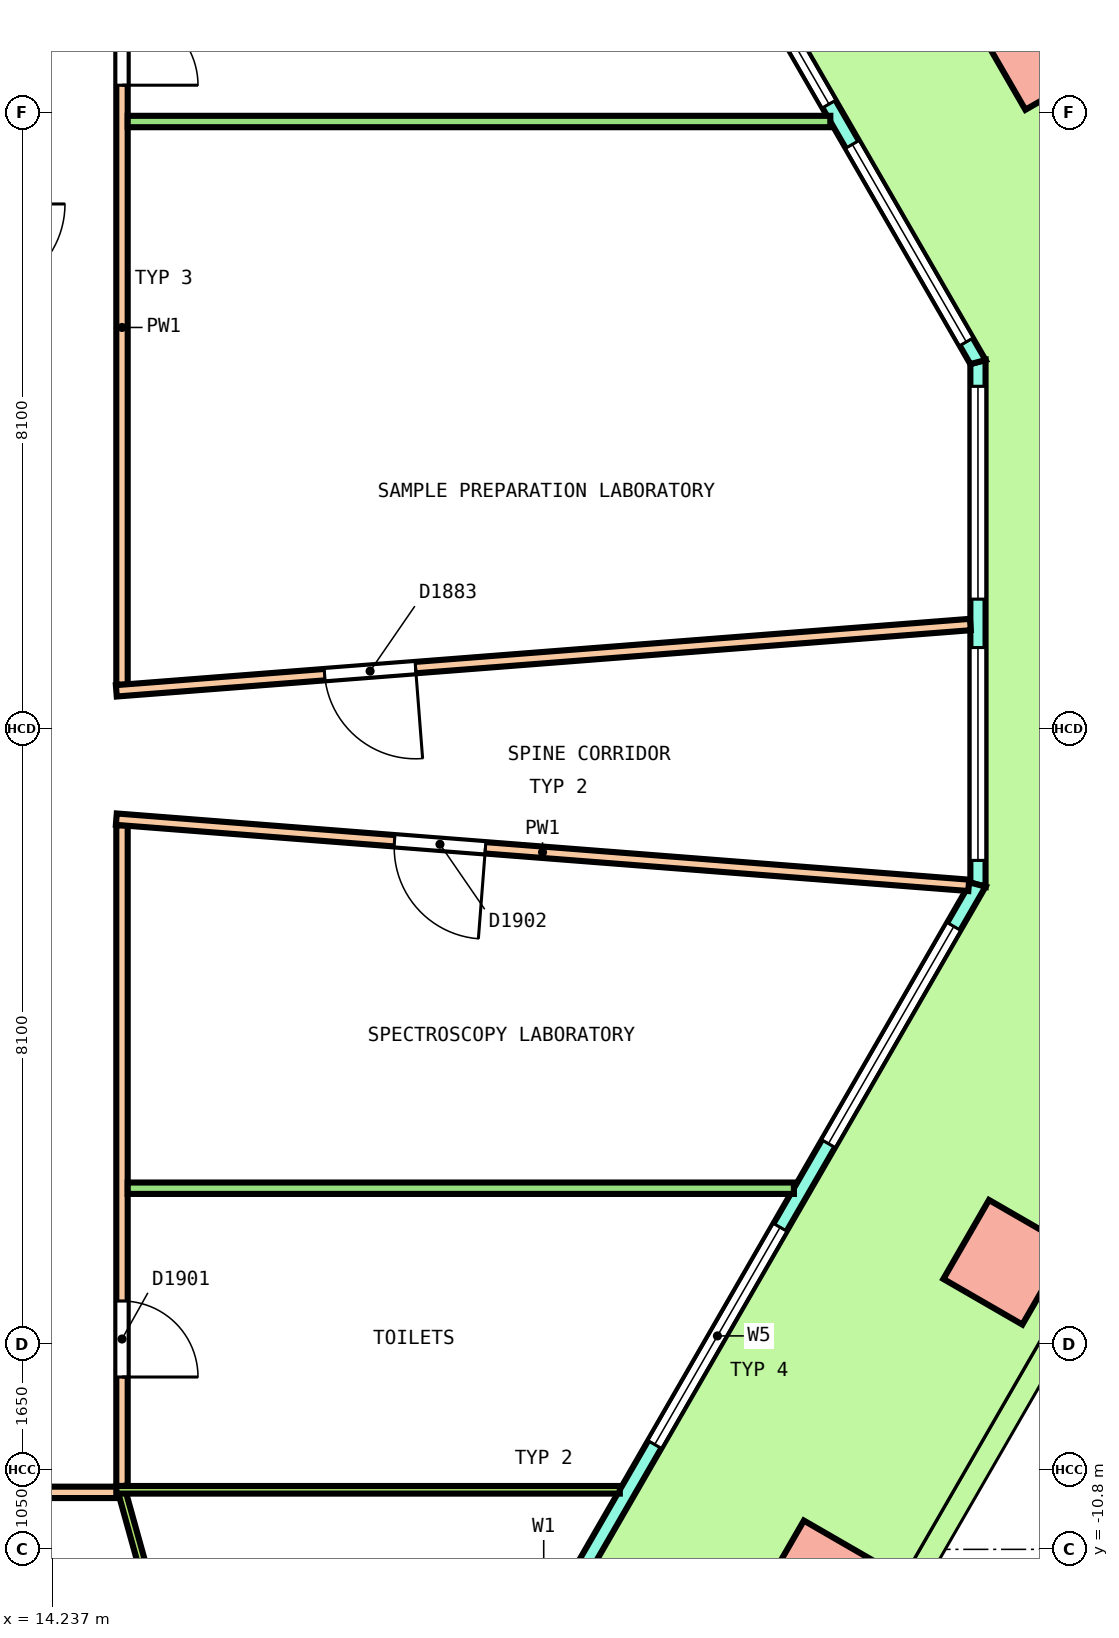
"""IFC4 building model, lengths in metres.
Left out: names, types, materials, properties, quantities, classifications, styles, units other than length and angle.
Written with IfcOpenShell. Run it as: python <this file> out.ifc"""

import sys

from ifc_helpers import new_model, si_unit, direction, frame, frame_2d, origin, origin_2d, place, context, subcontext, project, spatial, polyline, rectangle, outline, extrude, element, fill, save


model = new_model("IFC4")
c1 = context("Model", 3, precision=1e-05, world=origin(), true_north=direction((0.0, 1.0)))
c2 = subcontext(c1, "Body", "Model", "MODEL_VIEW")
j1 = project(units=[si_unit("LENGTHUNIT", "METRE"), si_unit("PLANEANGLEUNIT", "RADIAN")], contexts=[c1])
p1 = place(None, origin())
s1 = spatial("IfcSite", under=j1, at=p1, CompositionType="ELEMENT")
p2 = place(p1, origin())
s2 = spatial("IfcBuilding", under=s1, at=p2, CompositionType="ELEMENT")
p3 = place(p2, frame((0.0, 0.0, 189.2)))
s3 = spatial("IfcBuildingStorey", under=s2, at=p3, CompositionType="ELEMENT", Elevation=189.2)
for number, where, z_axis, x_axis in (
    (1, (27.255, 8.959, 0.0), (0.0, 0.0, 1.0), (-0.5, 0.866, 0.0)),
    (2, (24.341, -11.241, 0.0), (0.0, 0.0, 1.0), (0.5, 0.866, 0.0)),
    (3, (26.776, -7.023, 0.0), (0.0, 0.0, 1.0), (0.5, 0.866, 0.0)),
):
    element("IfcColumn", number, at=place(p3, frame(where, z_axis=z_axis, x_axis=x_axis)), inside=s3, PredefinedType="COLUMN", context=c2, shape_type="SweptSolid", body=[
        extrude(rectangle(XDim=1.2, YDim=1.2, at=origin_2d()), origin(), (0.0, 0.0, 1.0), 4.05),
    ])
p4 = place(p3, frame((26.411, -2.055, 0.0), z_axis=(0.0, 0.0, 1.0), x_axis=(0.0, 1.0, 0.0)))
e4 = element("IfcWall", 4, at=p4, inside=s3, PredefinedType="SOLIDWALL", context=c2, shape_type="SweptSolid", body=[
    extrude(outline(polyline([(-0.027, -0.1), (1.128, -0.1), (2.283, -0.1), (3.438, -0.1), (4.592, -0.1), (5.747, -0.1), (6.902, -0.1), (6.848, 0.1), (5.711, 0.1), (4.574, 0.1), (3.438, 0.1), (2.301, 0.1), (1.164, 0.1), (0.027, 0.1), (-0.027, -0.1)])), origin(), (0.0, 0.0, 1.0), 4.1),
])
p5 = place(p4, frame((0.319, 0.0, 0.1)))
e5 = element("IfcOpeningElement", 5, at=p5, cuts=e4, PredefinedType="OPENING", context=c2, shape_type="SweptSolid", body=[
    extrude(rectangle(XDim=2.8, YDim=2.9, at=frame_2d((1.4, 1.45))), frame((0.0, 0.11, 0.0), z_axis=(0.0, -1.0, 0.0), x_axis=(1.0, 0.0, 0.0)), (0.0, 0.0, 1.0), 0.22),
])
p6 = place(p4, frame((3.756, 0.0, 0.1)))
e6 = element("IfcOpeningElement", 6, at=p6, cuts=e4, PredefinedType="OPENING", context=c2, shape_type="SweptSolid", body=[
    extrude(rectangle(XDim=2.8, YDim=2.9, at=frame_2d((1.4, 1.45))), frame((0.0, 0.11, 0.0), z_axis=(0.0, -1.0, 0.0), x_axis=(1.0, 0.0, 0.0)), (0.0, 0.0, 1.0), 0.22),
])
p7 = place(p3, frame((26.411, 4.82, 0.0), z_axis=(0.0, 0.0, 1.0), x_axis=(-0.500000137386, 0.866025324465, 0.0)))
e7 = element("IfcWall", 7, at=p7, inside=s3, PredefinedType="SOLIDWALL", context=c2, shape_type="SweptSolid", body=[
    extrude(outline(polyline([(-0.027, -0.1), (0.979, -0.1), (1.986, -0.1), (2.992, -0.1), (3.999, -0.1), (5.005, -0.1), (6.012, -0.1), (7.018, -0.1), (8.025, -0.1), (9.031, -0.1), (10.038, -0.1), (11.044, -0.1), (12.051, -0.1), (13.057, -0.1), (14.063, -0.1), (15.07, -0.1), (16.076, -0.1), (17.083, -0.1), (18.089, -0.1), (18.036, 0.1), (17.035, 0.1), (16.035, 0.1), (15.034, 0.1), (14.034, 0.1), (13.033, 0.1), (12.033, 0.1), (11.032, 0.1), (10.032, 0.1), (9.031, 0.1), (8.031, 0.1), (7.03, 0.1), (6.03, 0.1), (5.029, 0.1), (4.029, 0.1), (3.028, 0.1), (2.028, 0.1), (1.027, 0.1), (0.027, 0.1), (-0.027, -0.1)])), origin(), (0.0, 0.0, 1.0), 4.1),
])
p8 = place(p7, frame((0.306, 0.0, 0.1)))
e8 = element("IfcOpeningElement", 8, at=p8, cuts=e7, PredefinedType="OPENING", context=c2, shape_type="SweptSolid", body=[
    extrude(rectangle(XDim=3.0, YDim=2.9, at=frame_2d((1.5, 1.45))), frame((0.0, 0.11, 0.0), z_axis=(0.0, -1.0, 0.0), x_axis=(1.0, 0.0, 0.0)), (0.0, 0.0, 1.0), 0.22),
])
p9 = place(p7, frame((3.919, 0.0, 0.1)))
e9 = element("IfcOpeningElement", 9, at=p9, cuts=e7, PredefinedType="OPENING", context=c2, shape_type="SweptSolid", body=[
    extrude(rectangle(XDim=3.0, YDim=2.9, at=frame_2d((1.5, 1.45))), frame((0.0, 0.11, 0.0), z_axis=(0.0, -1.0, 0.0), x_axis=(1.0, 0.0, 0.0)), (0.0, 0.0, 1.0), 0.22),
])
p10 = place(p7, frame((8.131, 0.0, 0.0)))
e10 = element("IfcOpeningElement", 10, at=p10, cuts=e7, PredefinedType="OPENING", context=c2, shape_type="SweptSolid", body=[
    extrude(rectangle(XDim=1.8, YDim=2.4, at=frame_2d((0.9, 1.2))), frame((0.0, 0.11, 0.0), z_axis=(0.0, -1.0, 0.0), x_axis=(1.0, 0.0, 0.0)), (0.0, 0.0, 1.0), 0.22),
])
p11 = place(p7, frame((8.131, 0.0, 2.55)))
e11 = element("IfcOpeningElement", 11, at=p11, cuts=e7, PredefinedType="OPENING", context=c2, shape_type="SweptSolid", body=[
    extrude(rectangle(XDim=1.8, YDim=0.45, at=frame_2d((0.9, 0.225))), frame((0.0, 0.11, 0.0), z_axis=(0.0, -1.0, 0.0), x_axis=(1.0, 0.0, 0.0)), (0.0, 0.0, 1.0), 0.22),
])
p12 = place(p7, frame((11.144, 0.0, 0.1)))
e12 = element("IfcOpeningElement", 12, at=p12, cuts=e7, PredefinedType="OPENING", context=c2, shape_type="SweptSolid", body=[
    extrude(rectangle(XDim=3.0, YDim=2.9, at=frame_2d((1.5, 1.45))), frame((0.0, 0.11, 0.0), z_axis=(0.0, -1.0, 0.0), x_axis=(1.0, 0.0, 0.0)), (0.0, 0.0, 1.0), 0.22),
])
p13 = place(p7, frame((14.756, 0.0, 0.1)))
e13 = element("IfcOpeningElement", 13, at=p13, cuts=e7, PredefinedType="OPENING", context=c2, shape_type="SweptSolid", body=[
    extrude(rectangle(XDim=3.0, YDim=2.9, at=frame_2d((1.5, 1.45))), frame((0.0, 0.11, 0.0), z_axis=(0.0, -1.0, 0.0), x_axis=(1.0, 0.0, 0.0)), (0.0, 0.0, 1.0), 0.22),
])
p14 = place(p3, frame((14.985, -21.845, 0.0), z_axis=(0.0, 0.0, 1.0), x_axis=(0.50000204422, 0.86602422355, 0.0)))
e14 = element("IfcWall", 14, at=p14, inside=s3, PredefinedType="SOLIDWALL", context=c2, shape_type="SweptSolid", body=[
    extrude(outline(polyline([(-0.027, -0.1), (1.014, -0.1), (2.055, -0.1), (3.097, -0.1), (4.138, -0.1), (5.179, -0.1), (6.22, -0.1), (7.261, -0.1), (8.303, -0.1), (9.344, -0.1), (10.385, -0.1), (11.426, -0.1), (12.468, -0.1), (13.509, -0.1), (14.55, -0.1), (15.591, -0.1), (16.632, -0.1), (17.673, -0.1), (18.715, -0.1), (19.756, -0.1), (20.797, -0.1), (21.838, -0.1), (22.879, -0.1), (22.826, 0.1), (21.789, 0.1), (20.753, 0.1), (19.717, 0.1), (18.68, 0.1), (17.644, 0.1), (16.608, 0.1), (15.572, 0.1), (14.535, 0.1), (13.499, 0.1), (12.463, 0.1), (11.426, 0.1), (10.39, 0.1), (9.354, 0.1), (8.317, 0.1), (7.281, 0.1), (6.245, 0.1), (5.208, 0.1), (4.172, 0.1), (3.136, 0.1), (2.099, 0.1), (1.063, 0.1), (0.027, 0.1), (-0.027, -0.1)])), origin(), (0.0, 0.0, 1.0), 4.1),
])
p15 = place(p14, frame((0.635, 0.0, 0.1)))
e15 = element("IfcOpeningElement", 15, at=p15, cuts=e14, PredefinedType="OPENING", context=c2, shape_type="SweptSolid", body=[
    extrude(rectangle(XDim=3.3, YDim=2.9, at=frame_2d((1.65, 1.45))), frame((0.0, 0.11, 0.0), z_axis=(0.0, -1.0, 0.0), x_axis=(1.0, 0.0, 0.0)), (0.0, 0.0, 1.0), 0.22),
])
p16 = place(p14, frame((5.206, 0.0, 0.1)))
e16 = element("IfcOpeningElement", 16, at=p16, cuts=e14, PredefinedType="OPENING", context=c2, shape_type="SweptSolid", body=[
    extrude(rectangle(XDim=3.3, YDim=2.9, at=frame_2d((1.65, 1.45))), frame((0.0, 0.11, 0.0), z_axis=(0.0, -1.0, 0.0), x_axis=(1.0, 0.0, 0.0)), (0.0, 0.0, 1.0), 0.22),
])
p17 = place(p14, frame((10.526, 0.0, 0.0)))
e17 = element("IfcOpeningElement", 17, at=p17, cuts=e14, PredefinedType="OPENING", context=c2, shape_type="SweptSolid", body=[
    extrude(rectangle(XDim=1.8, YDim=2.4, at=frame_2d((0.9, 1.2))), frame((0.0, 0.11, 0.0), z_axis=(0.0, -1.0, 0.0), x_axis=(1.0, 0.0, 0.0)), (0.0, 0.0, 1.0), 0.22),
])
p18 = place(p14, frame((10.526, 0.0, 2.55)))
e18 = element("IfcOpeningElement", 18, at=p18, cuts=e14, PredefinedType="OPENING", context=c2, shape_type="SweptSolid", body=[
    extrude(rectangle(XDim=1.8, YDim=0.45, at=frame_2d((0.9, 0.225))), frame((0.0, 0.11, 0.0), z_axis=(0.0, -1.0, 0.0), x_axis=(1.0, 0.0, 0.0)), (0.0, 0.0, 1.0), 0.22),
])
p19 = place(p14, frame((14.347, 0.0, 0.1)))
e19 = element("IfcOpeningElement", 19, at=p19, cuts=e14, PredefinedType="OPENING", context=c2, shape_type="SweptSolid", body=[
    extrude(rectangle(XDim=3.3, YDim=2.9, at=frame_2d((1.65, 1.45))), frame((0.0, 0.11, 0.0), z_axis=(0.0, -1.0, 0.0), x_axis=(1.0, 0.0, 0.0)), (0.0, 0.0, 1.0), 0.22),
])
p20 = place(p14, frame((18.917, 0.0, 0.1)))
e20 = element("IfcOpeningElement", 20, at=p20, cuts=e14, PredefinedType="OPENING", context=c2, shape_type="SweptSolid", body=[
    extrude(rectangle(XDim=3.3, YDim=2.9, at=frame_2d((1.65, 1.45))), frame((0.0, 0.11, 0.0), z_axis=(0.0, -1.0, 0.0), x_axis=(1.0, 0.0, 0.0)), (0.0, 0.0, 1.0), 0.22),
])
p21 = place(p3, frame((15.15, -9.966, 0.0), z_axis=(0.0, 0.0, 1.0), x_axis=(0.0, 1.0, 0.0)))
e21 = element("IfcWall", 21, at=p21, inside=s3, PredefinedType="PARTITIONING", context=c2, shape_type="SweptSolid", body=[
    extrude(rectangle(XDim=8.692, YDim=0.15, at=frame_2d((4.346, 0.0))), origin(), (0.0, 0.0, 1.0), 3.05),
])
p22 = place(p21, frame((1.434, 0.0, 0.0)))
e22 = element("IfcOpeningElement", 22, at=p22, cuts=e21, PredefinedType="OPENING", context=c2, shape_type="SweptSolid", body=[
    extrude(rectangle(XDim=1.0, YDim=2.1, at=frame_2d((0.5, 1.05))), frame((0.0, 0.085, 0.0), z_axis=(0.0, -1.0, 0.0), x_axis=(1.0, 0.0, 0.0)), (0.0, 0.0, 1.0), 0.17),
])
p23 = place(p3, frame((15.15, 0.576, 0.0), z_axis=(0.0, 0.0, 1.0), x_axis=(0.0, 1.0, 0.0)))
e23 = element("IfcWall", 23, at=p23, inside=s3, PredefinedType="PARTITIONING", context=c2, shape_type="SweptSolid", body=[
    extrude(rectangle(XDim=9.399, YDim=0.15, at=frame_2d((4.7, 0.0))), origin(), (0.0, 0.0, 1.0), 3.05),
])
p24 = place(p23, frame((7.887, 0.0, 0.0)))
e24 = element("IfcOpeningElement", 24, at=p24, cuts=e23, PredefinedType="OPENING", context=c2, shape_type="SweptSolid", body=[
    extrude(rectangle(XDim=1.0, YDim=2.1, at=frame_2d((0.5, 1.05))), frame((0.0, 0.085, 0.0), z_axis=(0.0, -1.0, 0.0), x_axis=(1.0, 0.0, 0.0)), (0.0, 0.0, 1.0), 0.17),
])
p25 = place(p3, frame((-15.225, -10.05, 0.0), z_axis=(0.0, 0.0, 1.0), x_axis=(1.0, 0.0, 0.0)))
e25 = element("IfcWall", 25, at=p25, inside=s3, PredefinedType="PARTITIONING", context=c2, shape_type="SweptSolid", body=[
    extrude(rectangle(XDim=30.325, YDim=0.15, at=frame_2d((15.163, 0.0))), origin(), (0.0, 0.0, 1.0), 3.05),
])
p26 = place(p25, frame((3.742, 0.0, 0.0)))
e26 = element("IfcOpeningElement", 26, at=p26, cuts=e25, PredefinedType="OPENING", context=c2, shape_type="SweptSolid", body=[
    extrude(rectangle(XDim=1.0, YDim=2.1, at=frame_2d((0.5, 1.05))), frame((0.0, 0.085, 0.0), z_axis=(0.0, -1.0, 0.0), x_axis=(1.0, 0.0, 0.0)), (0.0, 0.0, 1.0), 0.17),
])
p27 = place(p25, frame((12.193, 0.0, 0.0)))
e27 = element("IfcOpeningElement", 27, at=p27, cuts=e25, PredefinedType="OPENING", context=c2, shape_type="SweptSolid", body=[
    extrude(rectangle(XDim=1.2, YDim=2.1, at=frame_2d((0.6, 1.05))), frame((0.0, 0.085, 0.0), z_axis=(0.0, -1.0, 0.0), x_axis=(1.0, 0.0, 0.0)), (0.0, 0.0, 1.0), 0.17),
])
p28 = place(p25, frame((26.829, 0.0, 0.0)))
e28 = element("IfcOpeningElement", 28, at=p28, cuts=e25, PredefinedType="OPENING", context=c2, shape_type="SweptSolid", body=[
    extrude(rectangle(XDim=1.0, YDim=2.1, at=frame_2d((0.5, 1.05))), frame((0.0, 0.085, 0.0), z_axis=(0.0, -1.0, 0.0), x_axis=(1.0, 0.0, 0.0)), (0.0, 0.0, 1.0), 0.17),
])
p29 = place(p3, frame((15.075, 0.495, 0.0), z_axis=(0.0, 0.0, 1.0), x_axis=(0.996999820834, 0.077403858151, 0.0)))
e29 = element("IfcWall", 29, at=p29, inside=s3, PredefinedType="PARTITIONING", context=c2, shape_type="SweptSolid", body=[
    extrude(rectangle(XDim=11.27, YDim=0.15, at=frame_2d((5.635, 0.0))), origin(), (0.0, 0.0, 1.0), 3.05),
])
p30 = place(p29, frame((2.749, 0.0, 0.0)))
e30 = element("IfcOpeningElement", 30, at=p30, cuts=e29, PredefinedType="OPENING", context=c2, shape_type="SweptSolid", body=[
    extrude(rectangle(XDim=1.2, YDim=2.1, at=frame_2d((0.6, 1.05))), frame((0.0, 0.085, 0.0), z_axis=(0.0, -1.0, 0.0), x_axis=(1.0, 0.0, 0.0)), (0.0, 0.0, 1.0), 0.17),
])
p31 = place(p3, frame((15.075, -1.194, 0.0), z_axis=(0.0, 0.0, 1.0), x_axis=(0.997000362213, -0.077396884614, 0.0)))
e31 = element("IfcWall", 31, at=p31, inside=s3, PredefinedType="PARTITIONING", context=c2, shape_type="SweptSolid", body=[
    extrude(rectangle(XDim=11.249, YDim=0.15, at=frame_2d((5.624, 0.0))), origin(), (0.0, 0.0, 1.0), 3.05),
])
p32 = place(p31, frame((3.671, 0.0, 0.0)))
e32 = element("IfcOpeningElement", 32, at=p32, cuts=e31, PredefinedType="OPENING", context=c2, shape_type="SweptSolid", body=[
    extrude(rectangle(XDim=1.2, YDim=2.1, at=frame_2d((0.6, 1.05))), frame((0.0, 0.085, 0.0), z_axis=(0.0, -1.0, 0.0), x_axis=(1.0, 0.0, 0.0)), (0.0, 0.0, 1.0), 0.17),
])
p33 = place(p3, frame((15.225, 7.985, 0.0), z_axis=(0.0, 0.0, 1.0), x_axis=(1.0, 0.0, 0.0)))
e33 = element("IfcWall", 33, at=p33, inside=s3, PredefinedType="PARTITIONING", context=c2, shape_type="SweptSolid", body=[
    extrude(rectangle(XDim=9.243, YDim=0.15, at=frame_2d((4.622, 0.0))), origin(), (0.0, 0.0, 1.0), 3.05),
])
p34 = place(p3, frame((15.225, -6.049, 0.0), z_axis=(0.0, 0.0, 1.0), x_axis=(1.0, 0.0, 0.0)))
e34 = element("IfcWall", 34, at=p34, inside=s3, PredefinedType="PARTITIONING", context=c2, shape_type="SweptSolid", body=[
    extrude(rectangle(XDim=8.764, YDim=0.15, at=frame_2d((4.382, 0.0))), origin(), (0.0, 0.0, 1.0), 3.05),
])
p35 = place(p3, frame((15.13, -9.978, 0.0), z_axis=(0.0, 0.0, 1.0), x_axis=(0.268088761136, -0.963394216379, 0.0)))
e35 = element("IfcWall", 35, at=p35, inside=s3, PredefinedType="PARTITIONING", context=c2, shape_type="SweptSolid", body=[
    extrude(rectangle(XDim=3.679, YDim=0.1, at=frame_2d((1.84, 0.0))), origin(), (0.0, 0.0, 1.0), 3.05),
])
p36 = place(p35, frame((1.797, 0.0, 0.0)))
e36 = element("IfcOpeningElement", 36, at=p36, cuts=e35, PredefinedType="OPENING", context=c2, shape_type="SweptSolid", body=[
    extrude(rectangle(XDim=1.0, YDim=2.1, at=frame_2d((0.5, 1.05))), frame((0.0, 0.06, 0.0), z_axis=(0.0, -1.0, 0.0), x_axis=(1.0, 0.0, 0.0)), (0.0, 0.0, 1.0), 0.12),
])
p37 = place(p3, frame((15.075, -10.016, 0.0), z_axis=(0.0, 0.0, 1.0), x_axis=(1.0, 0.0, 0.0)))
e37 = element("IfcWall", 37, at=p37, inside=s3, PredefinedType="PARTITIONING", context=c2, shape_type="SweptSolid", body=[
    extrude(rectangle(XDim=6.624, YDim=0.1, at=frame_2d((3.312, 0.0))), origin(), (0.0, 0.0, 1.0), 3.05),
])
p38 = place(p5, origin())
e38 = element("IfcWindow", 38, at=p38, inside=s3, PartitioningType="SINGLE_PANEL", PredefinedType="WINDOW", context=c2, shape_type="SweptSolid", body=[
    extrude(rectangle(XDim=2.8, YDim=2.9, at=frame_2d((1.4, 1.45))), frame((0.0, 0.03, 0.0), z_axis=(0.0, -1.0, 0.0), x_axis=(1.0, 0.0, 0.0)), (0.0, 0.0, 1.0), 0.06),
])
fill(e5, e38)
p39 = place(p6, origin())
e39 = element("IfcWindow", 39, at=p39, inside=s3, PartitioningType="SINGLE_PANEL", PredefinedType="WINDOW", context=c2, shape_type="SweptSolid", body=[
    extrude(rectangle(XDim=2.8, YDim=2.9, at=frame_2d((1.4, 1.45))), frame((0.0, 0.03, 0.0), z_axis=(0.0, -1.0, 0.0), x_axis=(1.0, 0.0, 0.0)), (0.0, 0.0, 1.0), 0.06),
])
fill(e6, e39)
p40 = place(p8, origin())
e40 = element("IfcWindow", 40, at=p40, inside=s3, PartitioningType="SINGLE_PANEL", PredefinedType="WINDOW", context=c2, shape_type="SweptSolid", body=[
    extrude(rectangle(XDim=3.0, YDim=2.9, at=frame_2d((1.5, 1.45))), frame((0.0, 0.03, 0.0), z_axis=(0.0, -1.0, 0.0), x_axis=(1.0, 0.0, 0.0)), (0.0, 0.0, 1.0), 0.06),
])
fill(e8, e40)
p41 = place(p9, origin())
e41 = element("IfcWindow", 41, at=p41, inside=s3, PartitioningType="SINGLE_PANEL", PredefinedType="WINDOW", context=c2, shape_type="SweptSolid", body=[
    extrude(rectangle(XDim=3.0, YDim=2.9, at=frame_2d((1.5, 1.45))), frame((0.0, 0.03, 0.0), z_axis=(0.0, -1.0, 0.0), x_axis=(1.0, 0.0, 0.0)), (0.0, 0.0, 1.0), 0.06),
])
fill(e9, e41)
p42 = place(p19, origin())
e42 = element("IfcWindow", 42, at=p42, inside=s3, PartitioningType="SINGLE_PANEL", PredefinedType="WINDOW", context=c2, shape_type="SweptSolid", body=[
    extrude(rectangle(XDim=3.3, YDim=2.9, at=frame_2d((1.65, 1.45))), frame((0.0, 0.03, 0.0), z_axis=(0.0, -1.0, 0.0), x_axis=(1.0, 0.0, 0.0)), (0.0, 0.0, 1.0), 0.06),
])
fill(e19, e42)
p43 = place(p20, origin())
e43 = element("IfcWindow", 43, at=p43, inside=s3, PartitioningType="SINGLE_PANEL", PredefinedType="WINDOW", context=c2, shape_type="SweptSolid", body=[
    extrude(rectangle(XDim=3.3, YDim=2.9, at=frame_2d((1.65, 1.45))), frame((0.0, 0.03, 0.0), z_axis=(0.0, -1.0, 0.0), x_axis=(1.0, 0.0, 0.0)), (0.0, 0.0, 1.0), 0.06),
])
fill(e20, e43)
p44 = place(p30, origin())
e44 = element("IfcDoor", 44, at=p44, inside=s3, OperationType="DOUBLE_DOOR_SINGLE_SWING", PredefinedType="DOOR", context=c2, shape_type="SweptSolid", body=[
    extrude(rectangle(XDim=1.2, YDim=2.1, at=frame_2d((0.6, 1.05))), frame((0.0, 0.025, 0.0), z_axis=(0.0, -1.0, 0.0), x_axis=(1.0, 0.0, 0.0)), (0.0, 0.0, 1.0), 0.05),
])
fill(e30, e44)
p45 = place(p24, origin())
e45 = element("IfcDoor", 45, at=p45, inside=s3, OperationType="SINGLE_SWING_RIGHT", PredefinedType="DOOR", context=c2, shape_type="SweptSolid", body=[
    extrude(rectangle(XDim=1.0, YDim=2.1, at=frame_2d((0.5, 1.05))), frame((0.0, 0.025, 0.0), z_axis=(0.0, -1.0, 0.0), x_axis=(1.0, 0.0, 0.0)), (0.0, 0.0, 1.0), 0.05),
])
fill(e24, e45)
p46 = place(p22, origin())
e46 = element("IfcDoor", 46, at=p46, inside=s3, OperationType="SINGLE_SWING_RIGHT", PredefinedType="DOOR", context=c2, shape_type="SweptSolid", body=[
    extrude(rectangle(XDim=1.0, YDim=2.1, at=frame_2d((0.5, 1.05))), frame((0.0, 0.025, 0.0), z_axis=(0.0, -1.0, 0.0), x_axis=(1.0, 0.0, 0.0)), (0.0, 0.0, 1.0), 0.05),
])
fill(e22, e46)
p47 = place(p32, origin())
e47 = element("IfcDoor", 47, at=p47, inside=s3, OperationType="DOUBLE_DOOR_SINGLE_SWING", PredefinedType="DOOR", context=c2, shape_type="SweptSolid", body=[
    extrude(rectangle(XDim=1.2, YDim=2.1, at=frame_2d((0.6, 1.05))), frame((0.0, 0.025, 0.0), z_axis=(0.0, -1.0, 0.0), x_axis=(1.0, 0.0, 0.0)), (0.0, 0.0, 1.0), 0.05),
])
fill(e32, e47)
save(model, sys.argv[1])
